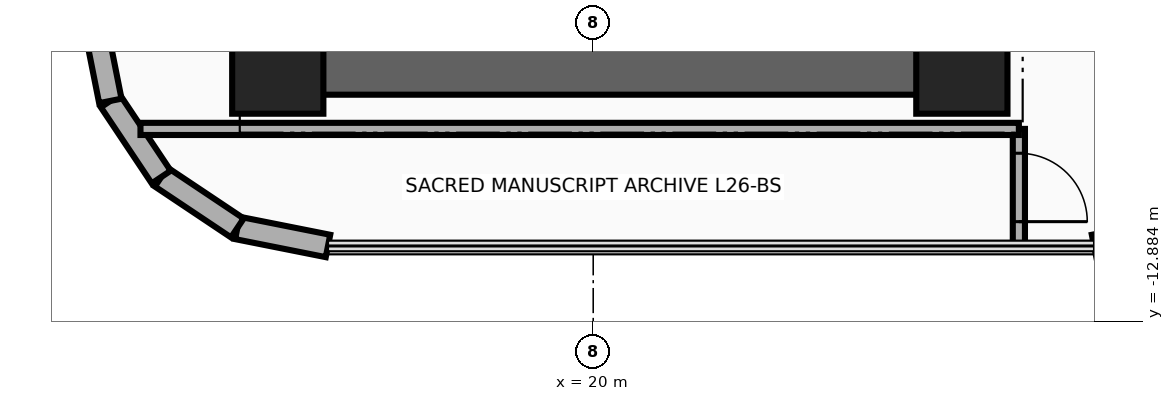
"""IFC4 building model, lengths in metres.
Left out: names, types, materials, properties, quantities, classifications, styles, units other than length and angle.
Written with IfcOpenShell. Run it as: python <this file> out.ifc"""

import sys

from ifc_helpers import new_model, si_unit, direction, frame, frame_2d, origin, origin_2d, place, context, subcontext, project, spatial, rectangle, extrude, source, transform, mapped, element, fill, save


model = new_model("IFC4")
c1 = context("Model", 3, precision=1e-05, world=origin(), true_north=direction((0.0, 1.0)))
c2 = subcontext(c1, "Body", "Model", "MODEL_VIEW")
j1 = project(units=[si_unit("LENGTHUNIT", "METRE"), si_unit("PLANEANGLEUNIT", "RADIAN")], contexts=[c1])
p1 = place(None, origin())
s1 = spatial("IfcSite", under=j1, at=p1, CompositionType="ELEMENT")
p2 = place(p1, origin())
s2 = spatial("IfcBuilding", under=s1, at=p2, CompositionType="ELEMENT")
p3 = place(p2, frame((0.0, 0.0, 105.7)))
s3 = spatial("IfcBuildingStorey", under=s2, at=p3, CompositionType="ELEMENT", Elevation=105.7)
p4 = place(p3, frame((24.85, -9.9, 0.0), z_axis=(0.0, 0.0, 1.0), x_axis=(0.0, 1.0, 0.0)))
e1 = element("IfcWall", 1, at=p4, inside=s3, PredefinedType="SHEAR", context=c2, shape_type="SweptSolid", body=[
    extrude(rectangle(XDim=8.95, YDim=0.7, at=frame_2d((4.475, 0.0))), origin(), (0.0, 0.0, 1.0), 3.46),
])
p5 = place(p3, frame((15.85, -9.55, 0.0), z_axis=(0.0, 0.0, 1.0), x_axis=(1.0, 0.0, 0.0)))
e2 = element("IfcWall", 2, at=p5, inside=s3, PredefinedType="SHEAR", context=c2, shape_type="SweptSolid", body=[
    extrude(rectangle(XDim=9.0, YDim=0.7, at=frame_2d((4.5, 0.0))), origin(), (0.0, 0.0, 1.0), 3.46),
])
m1 = source(origin(), c2, "Body", "SweptSolid", [
    extrude(rectangle(XDim=1.2, YDim=1.2, at=origin_2d()), origin(), (0.0, 0.0, 1.0), 3.7),
])
for number, where, z_axis, x_axis in (
    (3, (15.85, -9.55, 0.0), (0.0, 0.0, 1.0), (1.0, 0.0, 0.0)),
    (4, (24.85, -9.55, 0.0), (0.0, 0.0, 1.0), (1.0, 0.0, 0.0)),
):
    element("IfcColumn", number, at=place(p3, frame(where, z_axis=z_axis, x_axis=x_axis)), inside=s3, PredefinedType="COLUMN", context=c2, shape_type="MappedRepresentation", body=[
        mapped(m1, transform((0.0, 0.0, 0.0), x_axis=(1.0, 0.0, 0.0), y_axis=(0.0, 1.0, 0.0), z_axis=(0.0, 0.0, 1.0), scale=1.0)),
    ])
p6 = place(p3, frame((27.782, -11.653, 0.0), z_axis=(0.0, 0.0, 1.0), x_axis=(-0.980811661072, -0.194957650543, 0.0)))
e5 = element("IfcWall", 5, at=p6, inside=s3, PredefinedType="SOLIDWALL", context=c2, shape_type="SweptSolid", body=[
    extrude(rectangle(XDim=1.216, YDim=0.3, at=frame_2d((0.608, 0.0))), origin(), (0.0, 0.0, 1.0), 3.46),
])
p7 = place(p3, frame((16.511, -11.89, 0.0), z_axis=(0.0, 0.0, 1.0), x_axis=(-0.980804027463, 0.194996050505, 0.0)))
e6 = element("IfcWall", 6, at=p7, inside=s3, PredefinedType="SOLIDWALL", context=c2, shape_type="SweptSolid", body=[
    extrude(rectangle(XDim=1.216, YDim=0.3, at=frame_2d((0.608, 0.0))), origin(), (0.0, 0.0, 1.0), 3.46),
])
for number, where, z_axis, x_axis in (
    (7, (15.318, -11.653, 0.0), (0.0, 0.0, 1.0), (-0.831, 0.556, 0.0)),
    (8, (14.317, -10.983, 0.0), (0.0, 0.0, 1.0), (-0.556, 0.831, 0.0)),
):
    element("IfcWall", number, at=place(p3, frame(where, z_axis=z_axis, x_axis=x_axis)), inside=s3, PredefinedType="SOLIDWALL", context=c2, shape_type="SweptSolid", body=[
        extrude(rectangle(XDim=1.205, YDim=0.3, at=frame_2d((0.603, 0.0))), origin(), (0.0, 0.0, 1.0), 3.46),
    ])
p8 = place(p3, frame((13.647, -9.982, 0.0), z_axis=(0.0, 0.0, 1.0), x_axis=(-0.195189223115, 0.980765602568, 0.0)))
e9 = element("IfcWall", 9, at=p8, inside=s3, PredefinedType="SOLIDWALL", context=c2, shape_type="SweptSolid", body=[
    extrude(rectangle(XDim=1.216, YDim=0.3, at=frame_2d((0.608, 0.0))), origin(), (0.0, 0.0, 1.0), 3.46),
])
p9 = place(p3, frame((25.6, -11.89, 0.0), z_axis=(0.0, 0.0, 1.0), x_axis=(0.0, 1.0, 0.0)))
e10 = element("IfcWall", 10, at=p9, inside=s3, PredefinedType="PARTITIONING", context=c2, shape_type="SweptSolid", body=[
    extrude(rectangle(XDim=1.54, YDim=0.16, at=frame_2d((0.77, 0.0))), origin(), (0.0, 0.0, 1.0), 3.46),
])
p10 = place(p9, frame((0.32, 0.0, 0.0)))
e11 = element("IfcOpeningElement", 11, at=p10, cuts=e10, PredefinedType="OPENING", context=c2, shape_type="SweptSolid", body=[
    extrude(rectangle(XDim=0.9, YDim=2.1, at=frame_2d((0.45, 1.05))), frame((0.0, 0.095, 0.0), z_axis=(0.0, -1.0, 0.0), x_axis=(1.0, 0.0, 0.0)), (0.0, 0.0, 1.0), 0.19),
])
p11 = place(p3, frame((14.044, -10.35, 0.0), z_axis=(0.0, 0.0, 1.0), x_axis=(1.0, 0.0, 0.0)))
e12 = element("IfcWall", 12, at=p11, inside=s3, PredefinedType="PARTITIONING", context=c2, shape_type="SweptSolid", body=[
    extrude(rectangle(XDim=11.556, YDim=0.16, at=frame_2d((5.778, 0.0))), origin(), (0.0, 0.0, 1.0), 3.46),
])
p12 = place(p10, frame((0.9, 0.0, 0.0), z_axis=(0.0, 0.0, 1.0), x_axis=(-1.0, 0.0, 0.0)))
e13 = element("IfcDoor", 13, at=p12, inside=s3, OperationType="SINGLE_SWING_LEFT", PredefinedType="DOOR", context=c2, shape_type="SweptSolid", body=[
    extrude(rectangle(XDim=0.9, YDim=2.1, at=frame_2d((0.45, 1.05))), frame((0.0, 0.025, 0.0), z_axis=(0.0, -1.0, 0.0), x_axis=(1.0, 0.0, 0.0)), (0.0, 0.0, 1.0), 0.05),
])
fill(e11, e13)
save(model, sys.argv[1])
